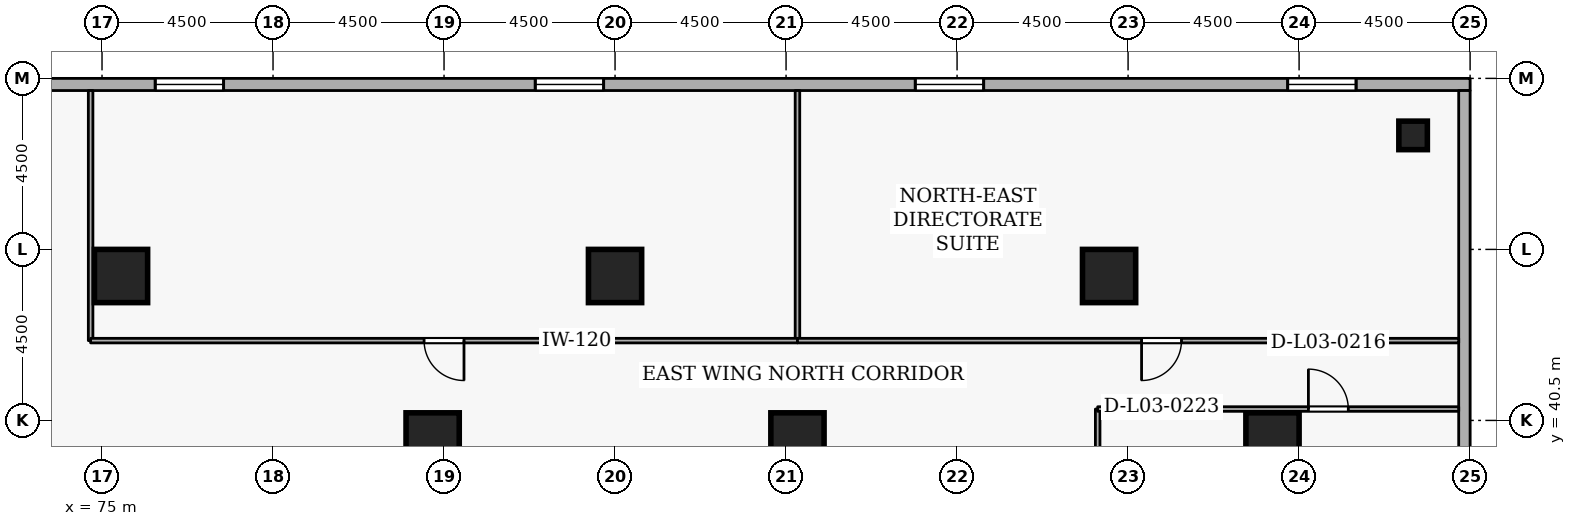
"""IFC4 building model, lengths in metres.
Left out: names, types, materials, properties, quantities, classifications, styles, units other than length and angle.
Written with IfcOpenShell. Run it as: python <this file> out.ifc"""

import sys

from ifc_helpers import new_model, si_unit, direction, frame, frame_2d, origin, origin_2d, place, context, subcontext, project, spatial, rectangle, extrude, element, fill, save


model = new_model("IFC4")
c1 = context("Model", 3, precision=1e-05, world=origin(), true_north=direction((0.0, 1.0)))
c2 = subcontext(c1, "Body", "Model", "MODEL_VIEW")
j1 = project(units=[si_unit("LENGTHUNIT", "METRE"), si_unit("PLANEANGLEUNIT", "RADIAN")], contexts=[c1])
p1 = place(None, origin())
s1 = spatial("IfcSite", under=j1, at=p1, CompositionType="ELEMENT")
p2 = place(p1, origin())
s2 = spatial("IfcBuilding", under=s1, at=p2, CompositionType="ELEMENT")
p3 = place(p2, frame((0.0, 0.0, 14.1)))
s3 = spatial("IfcBuildingStorey", under=s2, at=p3, CompositionType="ELEMENT", Elevation=14.1)
for number, where, z_axis, x_axis in (
    (1, (105.8, 40.0, 0.0), (0.0, 0.0, 1.0), (1.0, 0.0, 0.0)),
    (2, (101.5, 44.3, 0.0), (0.0, 0.0, 1.0), (1.0, 0.0, 0.0)),
    (3, (88.5, 44.3, 0.0), (0.0, 0.0, 1.0), (1.0, 0.0, 0.0)),
    (4, (75.5, 44.3, 0.0), (0.0, 0.0, 1.0), (1.0, 0.0, 0.0)),
    (5, (93.3, 40.0, 0.0), (0.0, 0.0, 1.0), (1.0, 0.0, 0.0)),
    (6, (83.7, 40.0, 0.0), (0.0, 0.0, 1.0), (1.0, 0.0, 0.0)),
):
    element("IfcColumn", number, at=place(p3, frame(where, z_axis=z_axis, x_axis=x_axis)), inside=s3, PredefinedType="COLUMN", context=c2, shape_type="SweptSolid", body=[
        extrude(rectangle(XDim=1.4, YDim=1.4, at=origin_2d()), origin(), (0.0, 0.0, 1.0), 4.5),
    ])
p4 = place(p3, frame((109.5, 48.0, 0.0), z_axis=(0.0, 0.0, 1.0), x_axis=(1.0, 0.0, 0.0)))
e7 = element("IfcColumn", 7, at=p4, inside=s3, PredefinedType="COLUMN", context=c2, shape_type="SweptSolid", body=[
    extrude(rectangle(XDim=0.75, YDim=0.75, at=origin_2d()), origin(), (0.0, 0.0, 1.0), 4.5),
])
p5 = place(p3, frame((111.0, 49.34, 0.0), z_axis=(0.0, 0.0, 1.0), x_axis=(-1.0, 0.0, 0.0)))
e8 = element("IfcWall", 8, at=p5, inside=s3, PredefinedType="STANDARD", context=c2, shape_type="SweptSolid", body=[
    extrude(rectangle(XDim=39.4, YDim=0.32, at=frame_2d((19.7, 0.0))), origin(), (0.0, 0.0, 1.0), 3.56),
])
p6 = place(p5, frame((3.0, 0.0, 0.78)))
e9 = element("IfcOpeningElement", 9, at=p6, cuts=e8, PredefinedType="OPENING", context=c2, shape_type="SweptSolid", body=[
    extrude(rectangle(XDim=1.8, YDim=2.15, at=frame_2d((0.9, 1.075))), frame((0.0, 0.17, 0.0), z_axis=(0.0, -1.0, 0.0), x_axis=(1.0, 0.0, 0.0)), (0.0, 0.0, 1.0), 0.34),
])
p7 = place(p5, frame((12.8, 0.0, 0.78)))
e10 = element("IfcOpeningElement", 10, at=p7, cuts=e8, PredefinedType="OPENING", context=c2, shape_type="SweptSolid", body=[
    extrude(rectangle(XDim=1.8, YDim=2.15, at=frame_2d((0.9, 1.075))), frame((0.0, 0.17, 0.0), z_axis=(0.0, -1.0, 0.0), x_axis=(1.0, 0.0, 0.0)), (0.0, 0.0, 1.0), 0.34),
])
p8 = place(p5, frame((22.8, 0.0, 0.78)))
e11 = element("IfcOpeningElement", 11, at=p8, cuts=e8, PredefinedType="OPENING", context=c2, shape_type="SweptSolid", body=[
    extrude(rectangle(XDim=1.8, YDim=2.15, at=frame_2d((0.9, 1.075))), frame((0.0, 0.17, 0.0), z_axis=(0.0, -1.0, 0.0), x_axis=(1.0, 0.0, 0.0)), (0.0, 0.0, 1.0), 0.34),
])
p9 = place(p5, frame((32.8, 0.0, 0.78)))
e12 = element("IfcOpeningElement", 12, at=p9, cuts=e8, PredefinedType="OPENING", context=c2, shape_type="SweptSolid", body=[
    extrude(rectangle(XDim=1.8, YDim=2.15, at=frame_2d((0.9, 1.075))), frame((0.0, 0.17, 0.0), z_axis=(0.0, -1.0, 0.0), x_axis=(1.0, 0.0, 0.0)), (0.0, 0.0, 1.0), 0.34),
])
p10 = place(p3, frame((110.85, 9.32, 0.0), z_axis=(0.0, 0.0, 1.0), x_axis=(0.0, 1.0, 0.0)))
e13 = element("IfcWall", 13, at=p10, inside=s3, PredefinedType="STANDARD", context=c2, shape_type="SweptSolid", body=[
    extrude(rectangle(XDim=39.86, YDim=0.3, at=frame_2d((19.93, 0.0))), origin(), (0.0, 0.0, 1.0), 3.56),
])
p11 = place(p3, frame((101.2, 27.0, 0.0), z_axis=(0.0, 0.0, 1.0), x_axis=(0.0, 1.0, 0.0)))
e14 = element("IfcWall", 14, at=p11, inside=s3, PredefinedType="PARTITIONING", context=c2, shape_type="SweptSolid", body=[
    extrude(rectangle(XDim=13.8, YDim=0.12, at=frame_2d((6.9, 0.0))), origin(), (0.0, 0.0, 1.0), 4.16),
])
p12 = place(p3, frame((101.2, 40.8, 0.0), z_axis=(0.0, 0.0, 1.0), x_axis=(1.0, 0.0, 0.0)))
e15 = element("IfcWall", 15, at=p12, inside=s3, PredefinedType="PARTITIONING", context=c2, shape_type="SweptSolid", body=[
    extrude(rectangle(XDim=9.5, YDim=0.12, at=frame_2d((4.75, 0.0))), origin(), (0.0, 0.0, 1.0), 4.16),
])
p13 = place(p12, frame((5.545, 0.0, 0.0)))
e16 = element("IfcOpeningElement", 16, at=p13, cuts=e15, PredefinedType="OPENING", context=c2, shape_type="SweptSolid", body=[
    extrude(rectangle(XDim=1.05, YDim=2.1, at=frame_2d((0.525, 1.05))), frame((0.0, 0.07, 0.0), z_axis=(0.0, -1.0, 0.0), x_axis=(1.0, 0.0, 0.0)), (0.0, 0.0, 1.0), 0.14),
])
for number, where, z_axis, x_axis in (
    (17, (74.7, 42.6, 0.0), (0.0, 0.0, 1.0), (0.0, 1.0, 0.0)),
    (18, (93.3, 49.18, 0.0), (0.0, 0.0, 1.0), (0.0, -1.0, 0.0)),
):
    element("IfcWall", number, at=place(p3, frame(where, z_axis=z_axis, x_axis=x_axis)), inside=s3, PredefinedType="PARTITIONING", context=c2, shape_type="SweptSolid", body=[
        extrude(rectangle(XDim=6.58, YDim=0.12, at=frame_2d((3.29, 0.0))), origin(), (0.0, 0.0, 1.0), 4.16),
    ])
p14 = place(p3, frame((93.3, 42.6, 0.0), z_axis=(0.0, 0.0, 1.0), x_axis=(-1.0, 0.0, 0.0)))
e19 = element("IfcWall", 19, at=p14, inside=s3, PredefinedType="PARTITIONING", context=c2, shape_type="SweptSolid", body=[
    extrude(rectangle(XDim=18.6, YDim=0.12, at=frame_2d((9.3, 0.0))), origin(), (0.0, 0.0, 1.0), 4.16),
])
p15 = place(p14, frame((8.775, 0.0, 0.0)))
e20 = element("IfcOpeningElement", 20, at=p15, cuts=e19, PredefinedType="OPENING", context=c2, shape_type="SweptSolid", body=[
    extrude(rectangle(XDim=1.05, YDim=2.1, at=frame_2d((0.525, 1.05))), frame((0.0, 0.07, 0.0), z_axis=(0.0, -1.0, 0.0), x_axis=(1.0, 0.0, 0.0)), (0.0, 0.0, 1.0), 0.14),
])
p16 = place(p3, frame((110.7, 42.6, 0.0), z_axis=(0.0, 0.0, 1.0), x_axis=(-1.0, 0.0, 0.0)))
e21 = element("IfcWall", 21, at=p16, inside=s3, PredefinedType="PARTITIONING", context=c2, shape_type="SweptSolid", body=[
    extrude(rectangle(XDim=17.4, YDim=0.12, at=frame_2d((8.7, 0.0))), origin(), (0.0, 0.0, 1.0), 4.16),
])
p17 = place(p16, frame((7.295, 0.0, 0.0)))
e22 = element("IfcOpeningElement", 22, at=p17, cuts=e21, PredefinedType="OPENING", context=c2, shape_type="SweptSolid", body=[
    extrude(rectangle(XDim=1.05, YDim=2.1, at=frame_2d((0.525, 1.05))), frame((0.0, 0.07, 0.0), z_axis=(0.0, -1.0, 0.0), x_axis=(1.0, 0.0, 0.0)), (0.0, 0.0, 1.0), 0.14),
])
p18 = place(p6, origin())
e23 = element("IfcWindow", 23, at=p18, inside=s3, PartitioningType="SINGLE_PANEL", PredefinedType="WINDOW", context=c2, shape_type="SweptSolid", body=[
    extrude(rectangle(XDim=1.8, YDim=2.15, at=frame_2d((0.9, 1.075))), frame((0.0, 0.03, 0.0), z_axis=(0.0, -1.0, 0.0), x_axis=(1.0, 0.0, 0.0)), (0.0, 0.0, 1.0), 0.06),
])
fill(e9, e23)
p19 = place(p7, origin())
e24 = element("IfcWindow", 24, at=p19, inside=s3, PartitioningType="SINGLE_PANEL", PredefinedType="WINDOW", context=c2, shape_type="SweptSolid", body=[
    extrude(rectangle(XDim=1.8, YDim=2.15, at=frame_2d((0.9, 1.075))), frame((0.0, 0.03, 0.0), z_axis=(0.0, -1.0, 0.0), x_axis=(1.0, 0.0, 0.0)), (0.0, 0.0, 1.0), 0.06),
])
fill(e10, e24)
p20 = place(p8, origin())
e25 = element("IfcWindow", 25, at=p20, inside=s3, PartitioningType="SINGLE_PANEL", PredefinedType="WINDOW", context=c2, shape_type="SweptSolid", body=[
    extrude(rectangle(XDim=1.8, YDim=2.15, at=frame_2d((0.9, 1.075))), frame((0.0, 0.03, 0.0), z_axis=(0.0, -1.0, 0.0), x_axis=(1.0, 0.0, 0.0)), (0.0, 0.0, 1.0), 0.06),
])
fill(e11, e25)
p21 = place(p9, origin())
e26 = element("IfcWindow", 26, at=p21, inside=s3, PartitioningType="SINGLE_PANEL", PredefinedType="WINDOW", context=c2, shape_type="SweptSolid", body=[
    extrude(rectangle(XDim=1.8, YDim=2.15, at=frame_2d((0.9, 1.075))), frame((0.0, 0.03, 0.0), z_axis=(0.0, -1.0, 0.0), x_axis=(1.0, 0.0, 0.0)), (0.0, 0.0, 1.0), 0.06),
])
fill(e12, e26)
p22 = place(p13, origin())
e27 = element("IfcDoor", 27, at=p22, inside=s3, OperationType="SINGLE_SWING_LEFT", PredefinedType="DOOR", context=c2, shape_type="SweptSolid", body=[
    extrude(rectangle(XDim=1.05, YDim=2.1, at=frame_2d((0.525, 1.05))), frame((0.0, 0.025, 0.0), z_axis=(0.0, -1.0, 0.0), x_axis=(1.0, 0.0, 0.0)), (0.0, 0.0, 1.0), 0.05),
])
fill(e16, e27)
p23 = place(p15, origin())
e28 = element("IfcDoor", 28, at=p23, inside=s3, OperationType="SINGLE_SWING_LEFT", PredefinedType="DOOR", context=c2, shape_type="SweptSolid", body=[
    extrude(rectangle(XDim=1.05, YDim=2.1, at=frame_2d((0.525, 1.05))), frame((0.0, 0.025, 0.0), z_axis=(0.0, -1.0, 0.0), x_axis=(1.0, 0.0, 0.0)), (0.0, 0.0, 1.0), 0.05),
])
fill(e20, e28)
p24 = place(p17, origin())
e29 = element("IfcDoor", 29, at=p24, inside=s3, OperationType="SINGLE_SWING_RIGHT", PredefinedType="DOOR", context=c2, shape_type="SweptSolid", body=[
    extrude(rectangle(XDim=1.05, YDim=2.1, at=frame_2d((0.525, 1.05))), frame((0.0, 0.025, 0.0), z_axis=(0.0, -1.0, 0.0), x_axis=(1.0, 0.0, 0.0)), (0.0, 0.0, 1.0), 0.05),
])
fill(e22, e29)
save(model, sys.argv[1])
